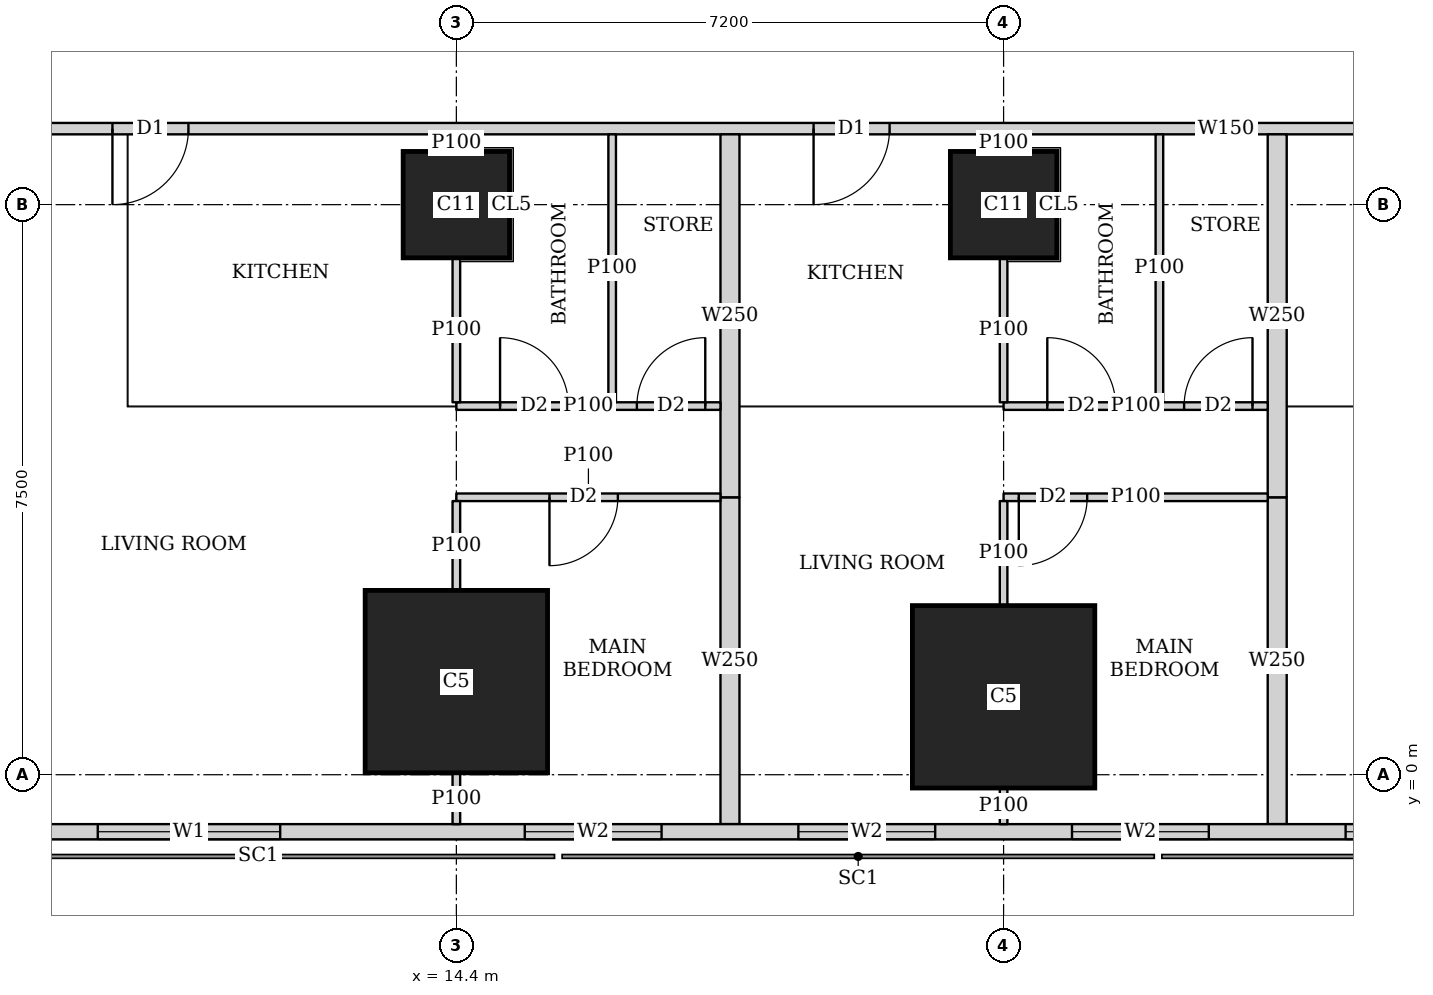
"""IFC4 building model, lengths in metres.
Left out: names, types, materials, properties, quantities, classifications, styles, units other than length and angle.
Written with IfcOpenShell. Run it as: python <this file> out.ifc"""

import sys

from ifc_helpers import new_model, si_unit, direction, frame, frame_2d, origin, origin_2d, place, context, subcontext, project, spatial, rectangle, extrude, element, fill, save


model = new_model("IFC4")
c1 = context("Model", 3, precision=1e-05, world=origin(), true_north=direction((0.0, 1.0)))
c2 = subcontext(c1, "Body", "Model", "MODEL_VIEW")
j1 = project(units=[si_unit("LENGTHUNIT", "METRE"), si_unit("PLANEANGLEUNIT", "RADIAN")], contexts=[c1])
p1 = place(None, origin())
s1 = spatial("IfcSite", under=j1, at=p1, CompositionType="ELEMENT")
p2 = place(p1, origin())
s2 = spatial("IfcBuilding", under=s1, at=p2, CompositionType="ELEMENT")
p3 = place(p2, frame((0.0, 0.0, 204.95)))
s3 = spatial("IfcBuildingStorey", under=s2, at=p3, CompositionType="ELEMENT", Elevation=204.95)
for number, where, z_axis, x_axis in (
    (1, (14.4, 1.225, 0.0), (0.0, 0.0, 1.0), (1.0, 0.0, 0.0)),
    (2, (21.6, 1.025, 0.0), (0.0, 0.0, 1.0), (1.0, 0.0, 0.0)),
):
    element("IfcColumn", number, at=place(p3, frame(where, z_axis=z_axis, x_axis=x_axis)), inside=s3, PredefinedType="COLUMN", context=c2, shape_type="SweptSolid", body=[
        extrude(rectangle(XDim=2.4, YDim=2.4, at=origin_2d()), origin(), (0.0, 0.0, 1.0), 3.75),
    ])
for number, where, z_axis, x_axis in (
    (3, (14.4, 7.5, 0.0), (0.0, 0.0, 1.0), (1.0, 0.0, 0.0)),
    (4, (21.6, 7.5, 0.0), (0.0, 0.0, 1.0), (1.0, 0.0, 0.0)),
):
    element("IfcColumn", number, at=place(p3, frame(where, z_axis=z_axis, x_axis=x_axis)), inside=s3, PredefinedType="COLUMN", context=c2, shape_type="SweptSolid", body=[
        extrude(rectangle(XDim=1.4, YDim=1.4, at=origin_2d()), origin(), (0.0, 0.0, 1.0), 3.75),
    ])
p4 = place(p3, frame((7.363, -0.75, 0.0), z_axis=(0.0, 0.0, 1.0), x_axis=(1.0, 0.0, 0.0)))
e5 = element("IfcWall", 5, at=p4, inside=s3, PredefinedType="SOLIDWALL", context=c2, shape_type="SweptSolid", body=[
    extrude(rectangle(XDim=40.428, YDim=0.2, at=frame_2d((20.214, 0.0))), origin(), (0.0, 0.0, 1.0), 3.5),
])
p5 = place(p4, frame((2.319, 0.0, 0.9)))
e6 = element("IfcOpeningElement", 6, at=p5, cuts=e5, PredefinedType="OPENING", context=c2, shape_type="SweptSolid", body=[
    extrude(rectangle(XDim=2.4, YDim=1.5, at=frame_2d((1.2, 0.75))), frame((0.0, 0.11, 0.0), z_axis=(0.0, -1.0, 0.0), x_axis=(1.0, 0.0, 0.0)), (0.0, 0.0, 1.0), 0.22),
])
p6 = place(p4, frame((7.937, 0.0, 0.9)))
e7 = element("IfcOpeningElement", 7, at=p6, cuts=e5, PredefinedType="OPENING", context=c2, shape_type="SweptSolid", body=[
    extrude(rectangle(XDim=1.8, YDim=1.5, at=frame_2d((0.9, 0.75))), frame((0.0, 0.11, 0.0), z_axis=(0.0, -1.0, 0.0), x_axis=(1.0, 0.0, 0.0)), (0.0, 0.0, 1.0), 0.22),
])
p7 = place(p4, frame((11.537, 0.0, 0.9)))
e8 = element("IfcOpeningElement", 8, at=p7, cuts=e5, PredefinedType="OPENING", context=c2, shape_type="SweptSolid", body=[
    extrude(rectangle(XDim=1.8, YDim=1.5, at=frame_2d((0.9, 0.75))), frame((0.0, 0.11, 0.0), z_axis=(0.0, -1.0, 0.0), x_axis=(1.0, 0.0, 0.0)), (0.0, 0.0, 1.0), 0.22),
])
p8 = place(p4, frame((15.137, 0.0, 0.9)))
e9 = element("IfcOpeningElement", 9, at=p8, cuts=e5, PredefinedType="OPENING", context=c2, shape_type="SweptSolid", body=[
    extrude(rectangle(XDim=1.8, YDim=1.5, at=frame_2d((0.9, 0.75))), frame((0.0, 0.11, 0.0), z_axis=(0.0, -1.0, 0.0), x_axis=(1.0, 0.0, 0.0)), (0.0, 0.0, 1.0), 0.22),
])
p9 = place(p4, frame((18.737, 0.0, 0.9)))
e10 = element("IfcOpeningElement", 10, at=p9, cuts=e5, PredefinedType="OPENING", context=c2, shape_type="SweptSolid", body=[
    extrude(rectangle(XDim=1.8, YDim=1.5, at=frame_2d((0.9, 0.75))), frame((0.0, 0.11, 0.0), z_axis=(0.0, -1.0, 0.0), x_axis=(1.0, 0.0, 0.0)), (0.0, 0.0, 1.0), 0.22),
])
p10 = place(p4, frame((22.337, 0.0, 0.9)))
e11 = element("IfcOpeningElement", 11, at=p10, cuts=e5, PredefinedType="OPENING", context=c2, shape_type="SweptSolid", body=[
    extrude(rectangle(XDim=1.8, YDim=1.5, at=frame_2d((0.9, 0.75))), frame((0.0, 0.11, 0.0), z_axis=(0.0, -1.0, 0.0), x_axis=(1.0, 0.0, 0.0)), (0.0, 0.0, 1.0), 0.22),
])
p11 = place(p4, frame((25.937, 0.0, 0.9)))
e12 = element("IfcOpeningElement", 12, at=p11, cuts=e5, PredefinedType="OPENING", context=c2, shape_type="SweptSolid", body=[
    extrude(rectangle(XDim=1.8, YDim=1.5, at=frame_2d((0.9, 0.75))), frame((0.0, 0.11, 0.0), z_axis=(0.0, -1.0, 0.0), x_axis=(1.0, 0.0, 0.0)), (0.0, 0.0, 1.0), 0.22),
])
p12 = place(p4, frame((29.537, 0.0, 0.9)))
e13 = element("IfcOpeningElement", 13, at=p12, cuts=e5, PredefinedType="OPENING", context=c2, shape_type="SweptSolid", body=[
    extrude(rectangle(XDim=1.8, YDim=1.5, at=frame_2d((0.9, 0.75))), frame((0.0, 0.11, 0.0), z_axis=(0.0, -1.0, 0.0), x_axis=(1.0, 0.0, 0.0)), (0.0, 0.0, 1.0), 0.22),
])
p13 = place(p3, frame((40.053, 8.5, 0.0), z_axis=(0.0, 0.0, 1.0), x_axis=(-1.0, 0.0, 0.0)))
e14 = element("IfcWall", 14, at=p13, inside=s3, PredefinedType="SOLIDWALL", context=c2, shape_type="SweptSolid", body=[
    extrude(rectangle(XDim=31.052, YDim=0.15, at=frame_2d((15.526, 0.0))), origin(), (0.0, 0.0, 1.0), 3.5),
])
p14 = place(p13, frame((29.178, 0.0, 0.0)))
e15 = element("IfcOpeningElement", 15, at=p14, cuts=e14, PredefinedType="OPENING", context=c2, shape_type="SweptSolid", body=[
    extrude(rectangle(XDim=1.0, YDim=2.1, at=frame_2d((0.5, 1.05))), frame((0.0, 0.085, 0.0), z_axis=(0.0, -1.0, 0.0), x_axis=(1.0, 0.0, 0.0)), (0.0, 0.0, 1.0), 0.17),
])
p15 = place(p13, frame((19.953, 0.0, 0.0)))
e16 = element("IfcOpeningElement", 16, at=p15, cuts=e14, PredefinedType="OPENING", context=c2, shape_type="SweptSolid", body=[
    extrude(rectangle(XDim=1.0, YDim=2.1, at=frame_2d((0.5, 1.05))), frame((0.0, 0.085, 0.0), z_axis=(0.0, -1.0, 0.0), x_axis=(1.0, 0.0, 0.0)), (0.0, 0.0, 1.0), 0.17),
])
p16 = place(p13, frame((12.753, 0.0, 0.0)))
e17 = element("IfcOpeningElement", 17, at=p16, cuts=e14, PredefinedType="OPENING", context=c2, shape_type="SweptSolid", body=[
    extrude(rectangle(XDim=1.0, YDim=2.1, at=frame_2d((0.5, 1.05))), frame((0.0, 0.085, 0.0), z_axis=(0.0, -1.0, 0.0), x_axis=(1.0, 0.0, 0.0)), (0.0, 0.0, 1.0), 0.17),
])
p17 = place(p13, frame((0.15, 0.0, 0.0)))
e18 = element("IfcOpeningElement", 18, at=p17, cuts=e14, PredefinedType="OPENING", context=c2, shape_type="SweptSolid", body=[
    extrude(rectangle(XDim=1.0, YDim=2.1, at=frame_2d((0.5, 1.05))), frame((0.0, 0.085, 0.0), z_axis=(0.0, -1.0, 0.0), x_axis=(1.0, 0.0, 0.0)), (0.0, 0.0, 1.0), 0.17),
])
p18 = place(p3, frame((17.875, 3.65, 0.0), z_axis=(0.0, 0.0, 1.0), x_axis=(-1.0, 0.0, 0.0)))
e19 = element("IfcWall", 19, at=p18, inside=s3, PredefinedType="PARTITIONING", context=c2, shape_type="SweptSolid", body=[
    extrude(rectangle(XDim=3.475, YDim=0.1, at=frame_2d((1.738, 0.0))), origin(), (0.0, 0.0, 1.0), 3.5),
])
p19 = place(p18, frame((1.35, 0.0, 0.0)))
e20 = element("IfcOpeningElement", 20, at=p19, cuts=e19, PredefinedType="OPENING", context=c2, shape_type="SweptSolid", body=[
    extrude(rectangle(XDim=0.9, YDim=2.1, at=frame_2d((0.45, 1.05))), frame((0.0, 0.06, 0.0), z_axis=(0.0, -1.0, 0.0), x_axis=(1.0, 0.0, 0.0)), (0.0, 0.0, 1.0), 0.12),
])
p20 = place(p3, frame((17.875, 4.85, 0.0), z_axis=(0.0, 0.0, 1.0), x_axis=(-1.0, 0.0, 0.0)))
e21 = element("IfcWall", 21, at=p20, inside=s3, PredefinedType="PARTITIONING", context=c2, shape_type="SweptSolid", body=[
    extrude(rectangle(XDim=3.475, YDim=0.1, at=frame_2d((1.738, 0.0))), origin(), (0.0, 0.0, 1.0), 3.5),
])
p21 = place(p20, frame((2.0, 0.0, 0.0)))
e22 = element("IfcOpeningElement", 22, at=p21, cuts=e21, PredefinedType="OPENING", context=c2, shape_type="SweptSolid", body=[
    extrude(rectangle(XDim=0.9, YDim=2.1, at=frame_2d((0.45, 1.05))), frame((0.0, 0.06, 0.0), z_axis=(0.0, -1.0, 0.0), x_axis=(1.0, 0.0, 0.0)), (0.0, 0.0, 1.0), 0.12),
])
p22 = place(p20, frame((0.2, 0.0, 0.0)))
e23 = element("IfcOpeningElement", 23, at=p22, cuts=e21, PredefinedType="OPENING", context=c2, shape_type="SweptSolid", body=[
    extrude(rectangle(XDim=0.9, YDim=2.1, at=frame_2d((0.45, 1.05))), frame((0.0, 0.06, 0.0), z_axis=(0.0, -1.0, 0.0), x_axis=(1.0, 0.0, 0.0)), (0.0, 0.0, 1.0), 0.12),
])
p23 = place(p3, frame((14.4, -0.65, 0.0), z_axis=(0.0, 0.0, 1.0), x_axis=(0.0, 1.0, 0.0)))
e24 = element("IfcWall", 24, at=p23, inside=s3, PredefinedType="PARTITIONING", context=c2, shape_type="SweptSolid", body=[
    extrude(rectangle(XDim=0.674, YDim=0.1, at=frame_2d((0.337, 0.0))), origin(), (0.0, 0.0, 1.0), 3.5),
])
p24 = place(p3, frame((14.4, 2.426, 0.0), z_axis=(0.0, 0.0, 1.0), x_axis=(0.0, 1.0, 0.0)))
e25 = element("IfcWall", 25, at=p24, inside=s3, PredefinedType="PARTITIONING", context=c2, shape_type="SweptSolid", body=[
    extrude(rectangle(XDim=1.174, YDim=0.1, at=frame_2d((0.587, 0.0))), origin(), (0.0, 0.0, 1.0), 3.5),
])
p25 = place(p3, frame((14.4, 4.9, 0.0), z_axis=(0.0, 0.0, 1.0), x_axis=(0.0, 1.0, 0.0)))
e26 = element("IfcWall", 26, at=p25, inside=s3, PredefinedType="PARTITIONING", context=c2, shape_type="SweptSolid", body=[
    extrude(rectangle(XDim=1.899, YDim=0.1, at=frame_2d((0.95, 0.0))), origin(), (0.0, 0.0, 1.0), 3.5),
])
p26 = place(p3, frame((14.4, 8.201, 0.0), z_axis=(0.0, 0.0, 1.0), x_axis=(0.0, 1.0, 0.0)))
e27 = element("IfcWall", 27, at=p26, inside=s3, PredefinedType="PARTITIONING", context=c2, shape_type="SweptSolid", body=[
    extrude(rectangle(XDim=0.224, YDim=0.1, at=frame_2d((0.112, 0.0))), origin(), (0.0, 0.0, 1.0), 3.5),
])
p27 = place(p3, frame((16.45, 4.9, 0.0), z_axis=(0.0, 0.0, 1.0), x_axis=(0.0, 1.0, 0.0)))
e28 = element("IfcWall", 28, at=p27, inside=s3, PredefinedType="PARTITIONING", context=c2, shape_type="SweptSolid", body=[
    extrude(rectangle(XDim=3.525, YDim=0.1, at=frame_2d((1.763, 0.0))), origin(), (0.0, 0.0, 1.0), 3.5),
])
p28 = place(p3, frame((25.075, 3.65, 0.0), z_axis=(0.0, 0.0, 1.0), x_axis=(-1.0, 0.0, 0.0)))
e29 = element("IfcWall", 29, at=p28, inside=s3, PredefinedType="PARTITIONING", context=c2, shape_type="SweptSolid", body=[
    extrude(rectangle(XDim=3.475, YDim=0.1, at=frame_2d((1.737, 0.0))), origin(), (0.0, 0.0, 1.0), 3.5),
])
p29 = place(p28, frame((2.375, 0.0, 0.0)))
e30 = element("IfcOpeningElement", 30, at=p29, cuts=e29, PredefinedType="OPENING", context=c2, shape_type="SweptSolid", body=[
    extrude(rectangle(XDim=0.9, YDim=2.1, at=frame_2d((0.45, 1.05))), frame((0.0, 0.06, 0.0), z_axis=(0.0, -1.0, 0.0), x_axis=(1.0, 0.0, 0.0)), (0.0, 0.0, 1.0), 0.12),
])
p30 = place(p3, frame((25.075, 4.85, 0.0), z_axis=(0.0, 0.0, 1.0), x_axis=(-1.0, 0.0, 0.0)))
e31 = element("IfcWall", 31, at=p30, inside=s3, PredefinedType="PARTITIONING", context=c2, shape_type="SweptSolid", body=[
    extrude(rectangle(XDim=3.475, YDim=0.1, at=frame_2d((1.737, 0.0))), origin(), (0.0, 0.0, 1.0), 3.5),
])
p31 = place(p30, frame((2.0, 0.0, 0.0)))
e32 = element("IfcOpeningElement", 32, at=p31, cuts=e31, PredefinedType="OPENING", context=c2, shape_type="SweptSolid", body=[
    extrude(rectangle(XDim=0.9, YDim=2.1, at=frame_2d((0.45, 1.05))), frame((0.0, 0.06, 0.0), z_axis=(0.0, -1.0, 0.0), x_axis=(1.0, 0.0, 0.0)), (0.0, 0.0, 1.0), 0.12),
])
p32 = place(p30, frame((0.2, 0.0, 0.0)))
e33 = element("IfcOpeningElement", 33, at=p32, cuts=e31, PredefinedType="OPENING", context=c2, shape_type="SweptSolid", body=[
    extrude(rectangle(XDim=0.9, YDim=2.1, at=frame_2d((0.45, 1.05))), frame((0.0, 0.06, 0.0), z_axis=(0.0, -1.0, 0.0), x_axis=(1.0, 0.0, 0.0)), (0.0, 0.0, 1.0), 0.12),
])
p33 = place(p3, frame((21.6, -0.65, 0.0), z_axis=(0.0, 0.0, 1.0), x_axis=(0.0, 1.0, 0.0)))
e34 = element("IfcWall", 34, at=p33, inside=s3, PredefinedType="PARTITIONING", context=c2, shape_type="SweptSolid", body=[
    extrude(rectangle(XDim=0.474, YDim=0.1, at=frame_2d((0.237, 0.0))), origin(), (0.0, 0.0, 1.0), 3.5),
])
p34 = place(p3, frame((21.6, 2.226, 0.0), z_axis=(0.0, 0.0, 1.0), x_axis=(0.0, 1.0, 0.0)))
e35 = element("IfcWall", 35, at=p34, inside=s3, PredefinedType="PARTITIONING", context=c2, shape_type="SweptSolid", body=[
    extrude(rectangle(XDim=1.374, YDim=0.1, at=frame_2d((0.687, 0.0))), origin(), (0.0, 0.0, 1.0), 3.5),
])
p35 = place(p3, frame((21.6, 4.9, 0.0), z_axis=(0.0, 0.0, 1.0), x_axis=(0.0, 1.0, 0.0)))
e36 = element("IfcWall", 36, at=p35, inside=s3, PredefinedType="PARTITIONING", context=c2, shape_type="SweptSolid", body=[
    extrude(rectangle(XDim=1.899, YDim=0.1, at=frame_2d((0.95, 0.0))), origin(), (0.0, 0.0, 1.0), 3.5),
])
p36 = place(p3, frame((21.6, 8.201, 0.0), z_axis=(0.0, 0.0, 1.0), x_axis=(0.0, 1.0, 0.0)))
e37 = element("IfcWall", 37, at=p36, inside=s3, PredefinedType="PARTITIONING", context=c2, shape_type="SweptSolid", body=[
    extrude(rectangle(XDim=0.224, YDim=0.1, at=frame_2d((0.112, 0.0))), origin(), (0.0, 0.0, 1.0), 3.5),
])
p37 = place(p3, frame((23.65, 4.9, 0.0), z_axis=(0.0, 0.0, 1.0), x_axis=(0.0, 1.0, 0.0)))
e38 = element("IfcWall", 38, at=p37, inside=s3, PredefinedType="PARTITIONING", context=c2, shape_type="SweptSolid", body=[
    extrude(rectangle(XDim=3.525, YDim=0.1, at=frame_2d((1.763, 0.0))), origin(), (0.0, 0.0, 1.0), 3.5),
])
p38 = place(p3, frame((18.0, -0.65, 0.0), z_axis=(0.0, 0.0, 1.0), x_axis=(0.0, 1.0, 0.0)))
e39 = element("IfcWall", 39, at=p38, inside=s3, PredefinedType="SOLIDWALL", context=c2, shape_type="SweptSolid", body=[
    extrude(rectangle(XDim=4.3, YDim=0.25, at=frame_2d((2.15, 0.0))), origin(), (0.0, 0.0, 1.0), 2.05),
])
p39 = place(p3, frame((18.0, 3.65, 0.0), z_axis=(0.0, 0.0, 1.0), x_axis=(0.0, 1.0, 0.0)))
e40 = element("IfcWall", 40, at=p39, inside=s3, PredefinedType="SOLIDWALL", context=c2, shape_type="SweptSolid", body=[
    extrude(rectangle(XDim=4.775, YDim=0.25, at=frame_2d((2.388, 0.0))), origin(), (0.0, 0.0, 1.0), 3.5),
])
p40 = place(p3, frame((25.2, -0.65, 0.0), z_axis=(0.0, 0.0, 1.0), x_axis=(0.0, 1.0, 0.0)))
e41 = element("IfcWall", 41, at=p40, inside=s3, PredefinedType="SOLIDWALL", context=c2, shape_type="SweptSolid", body=[
    extrude(rectangle(XDim=4.3, YDim=0.25, at=frame_2d((2.15, 0.0))), origin(), (0.0, 0.0, 1.0), 2.05),
])
p41 = place(p3, frame((25.2, 3.65, 0.0), z_axis=(0.0, 0.0, 1.0), x_axis=(0.0, 1.0, 0.0)))
e42 = element("IfcWall", 42, at=p41, inside=s3, PredefinedType="SOLIDWALL", context=c2, shape_type="SweptSolid", body=[
    extrude(rectangle(XDim=4.775, YDim=0.25, at=frame_2d((2.388, 0.0))), origin(), (0.0, 0.0, 1.0), 3.5),
])
p42 = place(p5, origin())
e43 = element("IfcWindow", 43, at=p42, inside=s3, PartitioningType="SINGLE_PANEL", PredefinedType="WINDOW", context=c2, shape_type="SweptSolid", body=[
    extrude(rectangle(XDim=2.4, YDim=1.5, at=frame_2d((1.2, 0.75))), frame((0.0, 0.03, 0.0), z_axis=(0.0, -1.0, 0.0), x_axis=(1.0, 0.0, 0.0)), (0.0, 0.0, 1.0), 0.06),
])
fill(e6, e43)
p43 = place(p6, origin())
e44 = element("IfcWindow", 44, at=p43, inside=s3, PartitioningType="SINGLE_PANEL", PredefinedType="WINDOW", context=c2, shape_type="SweptSolid", body=[
    extrude(rectangle(XDim=1.8, YDim=1.5, at=frame_2d((0.9, 0.75))), frame((0.0, 0.03, 0.0), z_axis=(0.0, -1.0, 0.0), x_axis=(1.0, 0.0, 0.0)), (0.0, 0.0, 1.0), 0.06),
])
fill(e7, e44)
p44 = place(p7, origin())
e45 = element("IfcWindow", 45, at=p44, inside=s3, PartitioningType="SINGLE_PANEL", PredefinedType="WINDOW", context=c2, shape_type="SweptSolid", body=[
    extrude(rectangle(XDim=1.8, YDim=1.5, at=frame_2d((0.9, 0.75))), frame((0.0, 0.03, 0.0), z_axis=(0.0, -1.0, 0.0), x_axis=(1.0, 0.0, 0.0)), (0.0, 0.0, 1.0), 0.06),
])
fill(e8, e45)
p45 = place(p8, origin())
e46 = element("IfcWindow", 46, at=p45, inside=s3, PartitioningType="SINGLE_PANEL", PredefinedType="WINDOW", context=c2, shape_type="SweptSolid", body=[
    extrude(rectangle(XDim=1.8, YDim=1.5, at=frame_2d((0.9, 0.75))), frame((0.0, 0.03, 0.0), z_axis=(0.0, -1.0, 0.0), x_axis=(1.0, 0.0, 0.0)), (0.0, 0.0, 1.0), 0.06),
])
fill(e9, e46)
p46 = place(p9, origin())
e47 = element("IfcWindow", 47, at=p46, inside=s3, PartitioningType="SINGLE_PANEL", PredefinedType="WINDOW", context=c2, shape_type="SweptSolid", body=[
    extrude(rectangle(XDim=1.8, YDim=1.5, at=frame_2d((0.9, 0.75))), frame((0.0, 0.03, 0.0), z_axis=(0.0, -1.0, 0.0), x_axis=(1.0, 0.0, 0.0)), (0.0, 0.0, 1.0), 0.06),
])
fill(e10, e47)
p47 = place(p19, origin())
e48 = element("IfcDoor", 48, at=p47, inside=s3, OperationType="SINGLE_SWING_RIGHT", PredefinedType="DOOR", context=c2, shape_type="SweptSolid", body=[
    extrude(rectangle(XDim=0.9, YDim=2.1, at=frame_2d((0.45, 1.05))), frame((0.0, 0.025, 0.0), z_axis=(0.0, -1.0, 0.0), x_axis=(1.0, 0.0, 0.0)), (0.0, 0.0, 1.0), 0.05),
])
fill(e20, e48)
p48 = place(p21, origin())
e49 = element("IfcDoor", 49, at=p48, inside=s3, OperationType="SINGLE_SWING_LEFT", PredefinedType="DOOR", context=c2, shape_type="SweptSolid", body=[
    extrude(rectangle(XDim=0.9, YDim=2.1, at=frame_2d((0.45, 1.05))), frame((0.0, 0.025, 0.0), z_axis=(0.0, -1.0, 0.0), x_axis=(1.0, 0.0, 0.0)), (0.0, 0.0, 1.0), 0.05),
])
fill(e22, e49)
p49 = place(p22, origin())
e50 = element("IfcDoor", 50, at=p49, inside=s3, OperationType="SINGLE_SWING_RIGHT", PredefinedType="DOOR", context=c2, shape_type="SweptSolid", body=[
    extrude(rectangle(XDim=0.9, YDim=2.1, at=frame_2d((0.45, 1.05))), frame((0.0, 0.025, 0.0), z_axis=(0.0, -1.0, 0.0), x_axis=(1.0, 0.0, 0.0)), (0.0, 0.0, 1.0), 0.05),
])
fill(e23, e50)
p50 = place(p14, origin())
e51 = element("IfcDoor", 51, at=p50, inside=s3, OperationType="SINGLE_SWING_RIGHT", PredefinedType="DOOR", context=c2, shape_type="SweptSolid", body=[
    extrude(rectangle(XDim=1.0, YDim=2.1, at=frame_2d((0.5, 1.05))), frame((0.0, 0.025, 0.0), z_axis=(0.0, -1.0, 0.0), x_axis=(1.0, 0.0, 0.0)), (0.0, 0.0, 1.0), 0.05),
])
fill(e15, e51)
p51 = place(p29, origin())
e52 = element("IfcDoor", 52, at=p51, inside=s3, OperationType="SINGLE_SWING_RIGHT", PredefinedType="DOOR", context=c2, shape_type="SweptSolid", body=[
    extrude(rectangle(XDim=0.9, YDim=2.1, at=frame_2d((0.45, 1.05))), frame((0.0, 0.025, 0.0), z_axis=(0.0, -1.0, 0.0), x_axis=(1.0, 0.0, 0.0)), (0.0, 0.0, 1.0), 0.05),
])
fill(e30, e52)
p52 = place(p31, origin())
e53 = element("IfcDoor", 53, at=p52, inside=s3, OperationType="SINGLE_SWING_LEFT", PredefinedType="DOOR", context=c2, shape_type="SweptSolid", body=[
    extrude(rectangle(XDim=0.9, YDim=2.1, at=frame_2d((0.45, 1.05))), frame((0.0, 0.025, 0.0), z_axis=(0.0, -1.0, 0.0), x_axis=(1.0, 0.0, 0.0)), (0.0, 0.0, 1.0), 0.05),
])
fill(e32, e53)
p53 = place(p32, origin())
e54 = element("IfcDoor", 54, at=p53, inside=s3, OperationType="SINGLE_SWING_RIGHT", PredefinedType="DOOR", context=c2, shape_type="SweptSolid", body=[
    extrude(rectangle(XDim=0.9, YDim=2.1, at=frame_2d((0.45, 1.05))), frame((0.0, 0.025, 0.0), z_axis=(0.0, -1.0, 0.0), x_axis=(1.0, 0.0, 0.0)), (0.0, 0.0, 1.0), 0.05),
])
fill(e33, e54)
p54 = place(p15, origin())
e55 = element("IfcDoor", 55, at=p54, inside=s3, OperationType="SINGLE_SWING_RIGHT", PredefinedType="DOOR", context=c2, shape_type="SweptSolid", body=[
    extrude(rectangle(XDim=1.0, YDim=2.1, at=frame_2d((0.5, 1.05))), frame((0.0, 0.025, 0.0), z_axis=(0.0, -1.0, 0.0), x_axis=(1.0, 0.0, 0.0)), (0.0, 0.0, 1.0), 0.05),
])
fill(e16, e55)
save(model, sys.argv[1])
